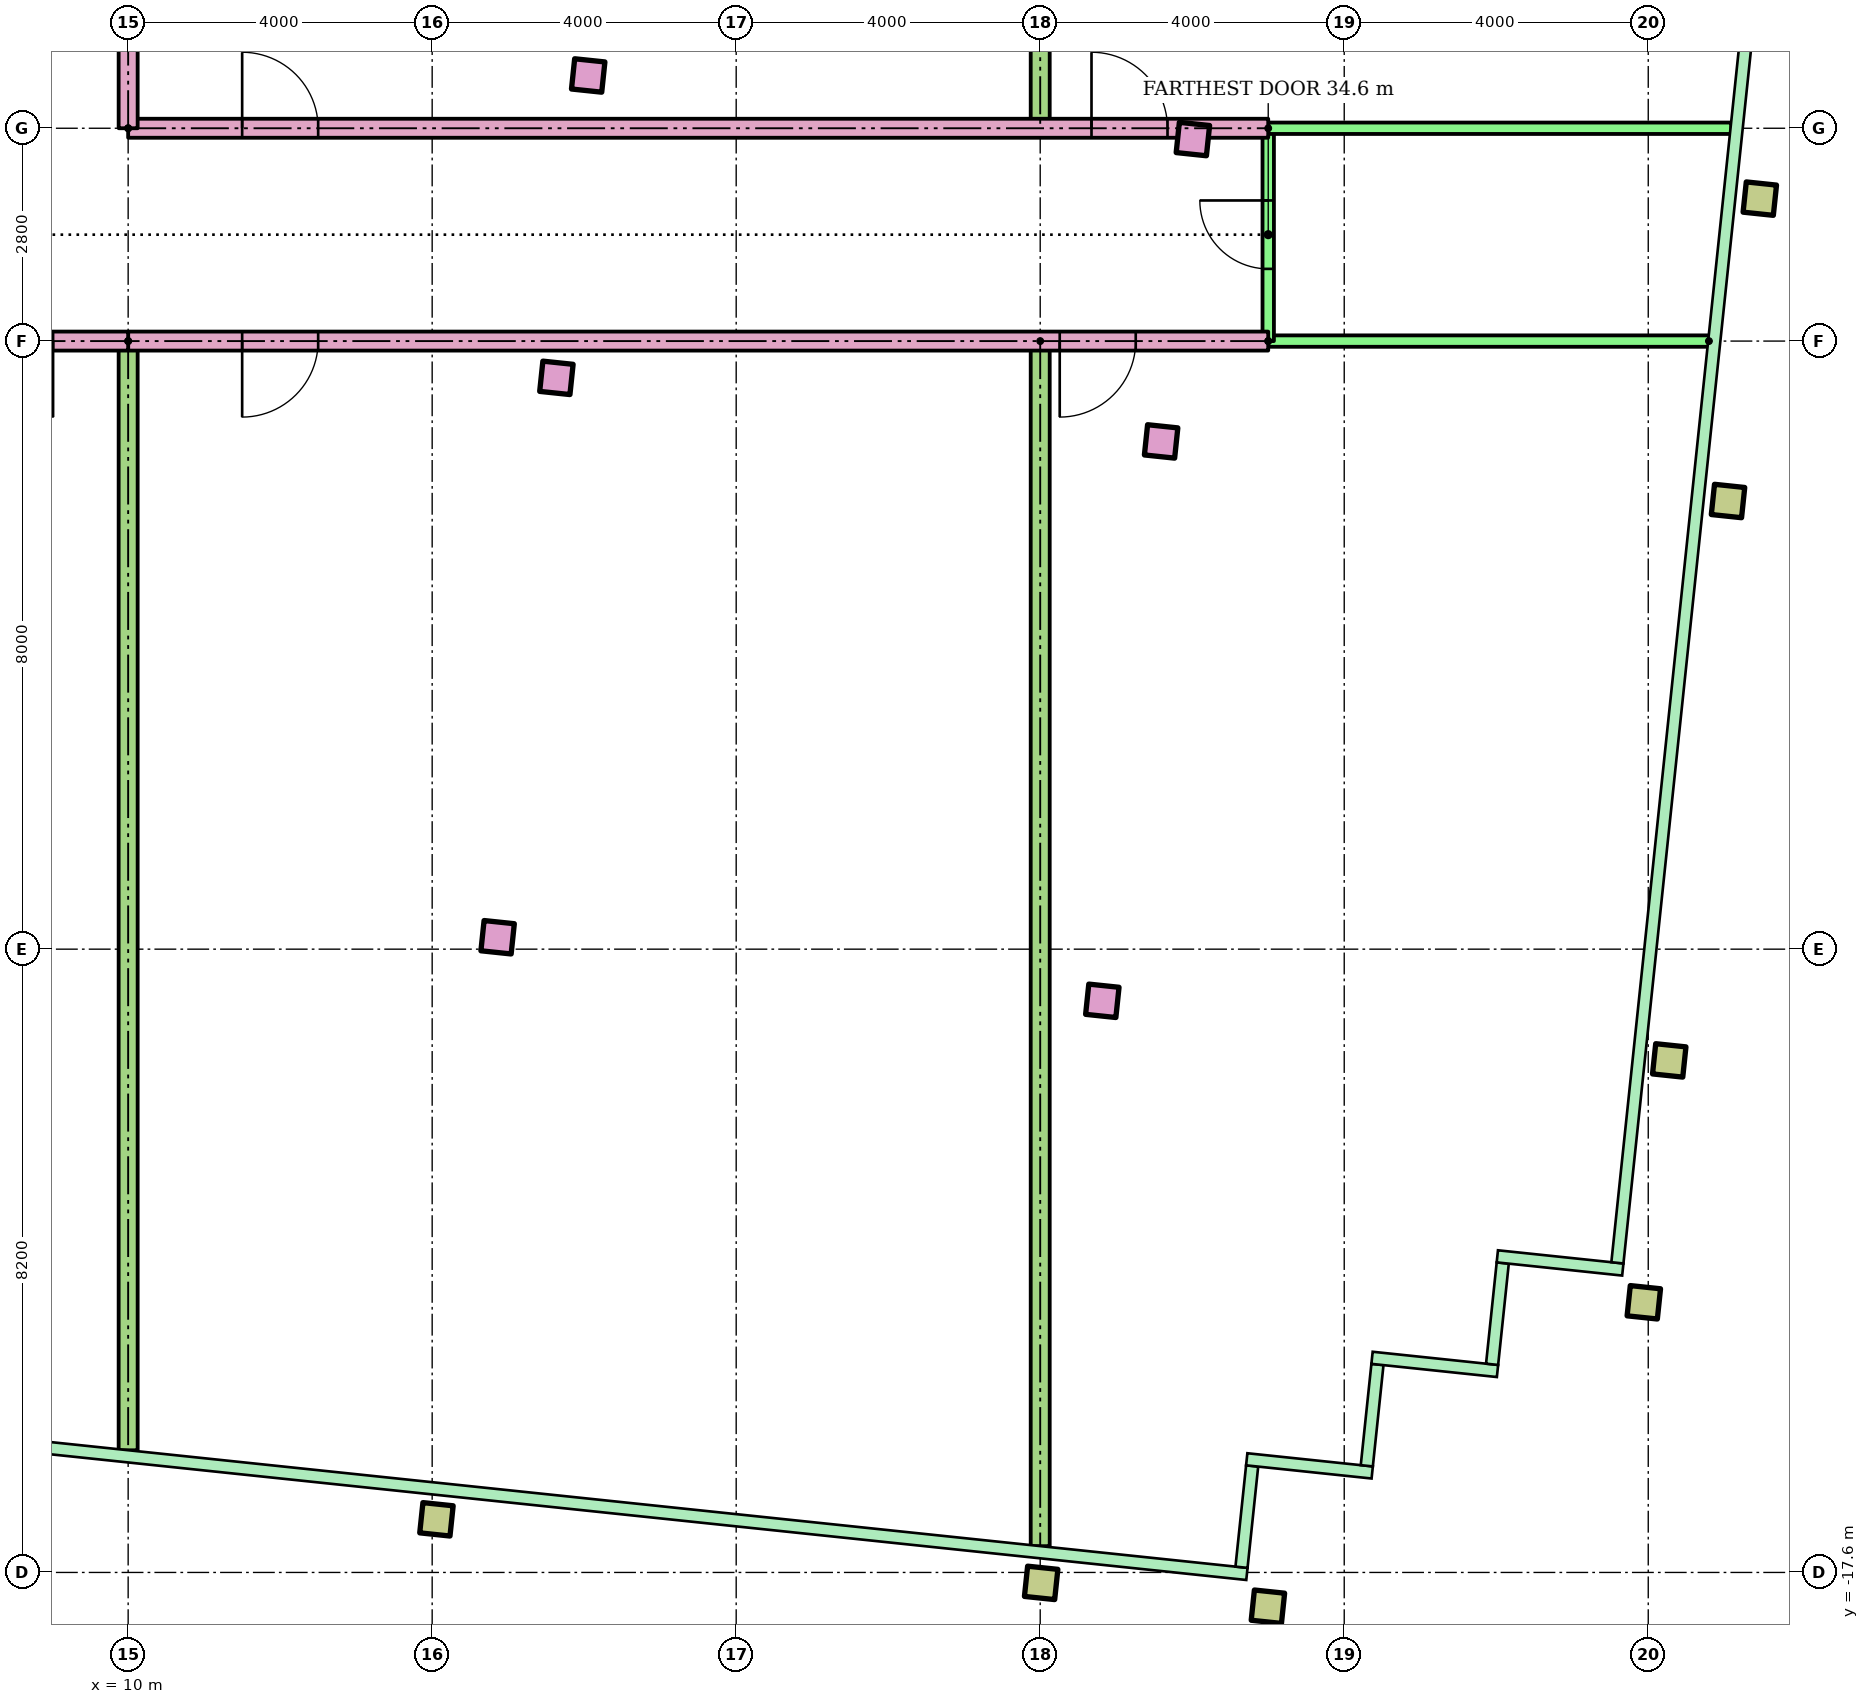
"""IFC4 building model, lengths in metres.
Left out: names, types, materials, properties, quantities, classifications, styles, units other than length and angle.
Written with IfcOpenShell. Run it as: python <this file> out.ifc"""

import sys

from ifc_helpers import new_model, si_unit, direction, frame, frame_2d, origin, origin_2d, place, context, subcontext, project, spatial, rectangle, hollow_rectangle, extrude, element, fill, save


model = new_model("IFC4")
c1 = context("Model", 3, precision=1e-05, world=origin(), true_north=direction((0.0, 1.0)))
c2 = subcontext(c1, "Body", "Model", "MODEL_VIEW")
j1 = project(units=[si_unit("LENGTHUNIT", "METRE"), si_unit("PLANEANGLEUNIT", "RADIAN")], contexts=[c1])
p1 = place(None, origin())
s1 = spatial("IfcSite", under=j1, at=p1, CompositionType="ELEMENT")
p2 = place(p1, origin())
s2 = spatial("IfcBuilding", under=s1, at=p2, CompositionType="ELEMENT")
p3 = place(p2, frame((0.0, 0.0, 298.3)))
s3 = spatial("IfcBuildingStorey", under=s2, at=p3, CompositionType="ELEMENT", Elevation=298.3)
for number, where, z_axis, x_axis in (
    (1, (14.056, -16.901, 0.0), (0.0, 0.0, 1.0), (0.995, -0.105, 0.0)),
    (2, (22.012, -17.737, 0.0), (0.0, 0.0, 1.0), (0.995, -0.105, 0.0)),
    (3, (24.996, -18.051, 0.0), (0.0, 0.0, 1.0), (0.995, -0.105, 0.0)),
    (4, (29.942, -14.046, 0.0), (0.0, 0.0, 1.0), (0.995, -0.105, 0.0)),
):
    element("IfcColumn", number, at=place(p3, frame(where, z_axis=z_axis, x_axis=x_axis)), inside=s3, PredefinedType="COLUMN", context=c2, shape_type="SweptSolid", body=[
        extrude(hollow_rectangle(XDim=0.4, YDim=0.4, WallThickness=0.02, at=origin_2d()), origin(), (0.0, 0.0, 1.0), 3.4),
    ])
for number, where, z_axis, x_axis in (
    (5, (14.861, -9.243, 0.0), (0.0, 0.0, 1.0), (0.995, -0.105, 0.0)),
    (6, (22.817, -10.08, 0.0), (0.0, 0.0, 1.0), (0.995, -0.105, 0.0)),
):
    element("IfcColumn", number, at=place(p3, frame(where, z_axis=z_axis, x_axis=x_axis)), inside=s3, PredefinedType="COLUMN", context=c2, shape_type="SweptSolid", body=[
        extrude(rectangle(XDim=0.4, YDim=0.4, at=origin_2d()), origin(), (0.0, 0.0, 1.0), 3.4),
    ])
p4 = place(p3, frame((30.276, -10.864, 0.0), z_axis=(0.0, 0.0, 1.0), x_axis=(0.994521895368, -0.104528463268, 0.0)))
e7 = element("IfcColumn", 7, at=p4, inside=s3, PredefinedType="COLUMN", context=c2, shape_type="SweptSolid", body=[
    extrude(hollow_rectangle(XDim=0.4, YDim=0.4, WallThickness=0.02, at=origin_2d()), origin(), (0.0, 0.0, 1.0), 3.4),
])
for number, where, z_axis, x_axis in (
    (8, (15.635, -1.884, 0.0), (0.0, 0.0, 1.0), (0.995, -0.105, 0.0)),
    (9, (23.591, -2.72, 0.0), (0.0, 0.0, 1.0), (0.995, -0.105, 0.0)),
):
    element("IfcColumn", number, at=place(p3, frame(where, z_axis=z_axis, x_axis=x_axis)), inside=s3, PredefinedType="COLUMN", context=c2, shape_type="SweptSolid", body=[
        extrude(rectangle(XDim=0.4, YDim=0.4, at=origin_2d()), origin(), (0.0, 0.0, 1.0), 3.4),
    ])
p5 = place(p3, frame((31.05, -3.504, 0.0), z_axis=(0.0, 0.0, 1.0), x_axis=(0.994521895368, -0.104528463268, 0.0)))
e10 = element("IfcColumn", 10, at=p5, inside=s3, PredefinedType="COLUMN", context=c2, shape_type="SweptSolid", body=[
    extrude(hollow_rectangle(XDim=0.4, YDim=0.4, WallThickness=0.02, at=origin_2d()), origin(), (0.0, 0.0, 1.0), 3.4),
])
for number, where, z_axis, x_axis in (
    (11, (16.053, 2.094, 0.0), (0.0, 0.0, 1.0), (0.995, -0.105, 0.0)),
    (12, (24.009, 1.258, 0.0), (0.0, 0.0, 1.0), (0.995, -0.105, 0.0)),
):
    element("IfcColumn", number, at=place(p3, frame(where, z_axis=z_axis, x_axis=x_axis)), inside=s3, PredefinedType="COLUMN", context=c2, shape_type="SweptSolid", body=[
        extrude(rectangle(XDim=0.4, YDim=0.4, at=origin_2d()), origin(), (0.0, 0.0, 1.0), 3.4),
    ])
p6 = place(p3, frame((31.468, 0.474, 0.0), z_axis=(0.0, 0.0, 1.0), x_axis=(0.994521895368, -0.104528463268, 0.0)))
e13 = element("IfcColumn", 13, at=p6, inside=s3, PredefinedType="COLUMN", context=c2, shape_type="SweptSolid", body=[
    extrude(hollow_rectangle(XDim=0.4, YDim=0.4, WallThickness=0.02, at=origin_2d()), origin(), (0.0, 0.0, 1.0), 3.4),
])
p7 = place(p3, frame((25.0, -1.4, 0.0), z_axis=(0.0, 0.0, 1.0), x_axis=(-1.0, 0.0, 0.0)))
e14 = element("IfcWall", 14, at=p7, inside=s3, PredefinedType="PARTITIONING", context=c2, shape_type="SweptSolid", body=[
    extrude(rectangle(XDim=15.0, YDim=0.25, at=frame_2d((7.5, 0.0))), origin(), (0.0, 0.0, 1.0), 2.6),
])
p8 = place(p7, frame((12.5, 0.0, 0.0)))
e15 = element("IfcOpeningElement", 15, at=p8, cuts=e14, PredefinedType="OPENING", context=c2, shape_type="SweptSolid", body=[
    extrude(rectangle(XDim=1.0, YDim=2.1, at=frame_2d((0.5, 1.05))), frame((0.0, 0.135, 0.0), z_axis=(0.0, -1.0, 0.0), x_axis=(1.0, 0.0, 0.0)), (0.0, 0.0, 1.0), 0.27),
])
p9 = place(p7, frame((1.743, 0.0, 0.0)))
e16 = element("IfcOpeningElement", 16, at=p9, cuts=e14, PredefinedType="OPENING", context=c2, shape_type="SweptSolid", body=[
    extrude(rectangle(XDim=1.0, YDim=2.1, at=frame_2d((0.5, 1.05))), frame((0.0, 0.135, 0.0), z_axis=(0.0, -1.0, 0.0), x_axis=(1.0, 0.0, 0.0)), (0.0, 0.0, 1.0), 0.27),
])
p10 = place(p3, frame((30.798, -1.4, 0.0), z_axis=(0.0, 0.0, 1.0), x_axis=(-1.0, 0.0, 0.0)))
e17 = element("IfcWall", 17, at=p10, inside=s3, PredefinedType="PARTITIONING", context=c2, shape_type="SweptSolid", body=[
    extrude(rectangle(XDim=5.798, YDim=0.15, at=frame_2d((2.899, 0.0))), origin(), (0.0, 0.0, 1.0), 2.6),
])
p11 = place(p3, frame((25.0, -1.4, 0.0), z_axis=(0.0, 0.0, 1.0), x_axis=(0.0, 1.0, 0.0)))
e18 = element("IfcWall", 18, at=p11, inside=s3, PredefinedType="PARTITIONING", context=c2, shape_type="SweptSolid", body=[
    extrude(rectangle(XDim=2.8, YDim=0.15, at=frame_2d((1.4, 0.0))), origin(), (0.0, 0.0, 1.0), 2.6),
])
p12 = place(p11, frame((0.95, 0.0, 0.0)))
e19 = element("IfcOpeningElement", 19, at=p12, cuts=e18, PredefinedType="OPENING", context=c2, shape_type="SweptSolid", body=[
    extrude(rectangle(XDim=0.9, YDim=2.1, at=frame_2d((0.45, 1.05))), frame((0.0, 0.085, 0.0), z_axis=(0.0, -1.0, 0.0), x_axis=(1.0, 0.0, 0.0)), (0.0, 0.0, 1.0), 0.17),
])
p13 = place(p3, frame((10.0, -1.4, 0.0), z_axis=(0.0, 0.0, 1.0), x_axis=(0.0, -1.0, 0.0)))
e20 = element("IfcWall", 20, at=p13, inside=s3, PredefinedType="PARTITIONING", context=c2, shape_type="SweptSolid", body=[
    extrude(rectangle(XDim=14.593, YDim=0.25, at=frame_2d((7.297, 0.0))), origin(), (0.0, 0.0, 1.0), 2.6),
])
p14 = place(p3, frame((22.0, -1.4, 0.0), z_axis=(0.0, 0.0, 1.0), x_axis=(0.0, -1.0, 0.0)))
e21 = element("IfcWall", 21, at=p14, inside=s3, PredefinedType="PARTITIONING", context=c2, shape_type="SweptSolid", body=[
    extrude(rectangle(XDim=15.854, YDim=0.25, at=frame_2d((7.927, 0.0))), origin(), (0.0, 0.0, 1.0), 2.6),
])
p15 = place(p3, frame((10.0, 1.4, 0.0)))
e22 = element("IfcWall", 22, at=p15, inside=s3, PredefinedType="PARTITIONING", context=c2, shape_type="SweptSolid", body=[
    extrude(rectangle(XDim=15.0, YDim=0.25, at=frame_2d((7.5, 0.0))), origin(), (0.0, 0.0, 1.0), 2.6),
])
p16 = place(p15, frame((1.5, 0.0, 0.0)))
e23 = element("IfcOpeningElement", 23, at=p16, cuts=e22, PredefinedType="OPENING", context=c2, shape_type="SweptSolid", body=[
    extrude(rectangle(XDim=1.0, YDim=2.1, at=frame_2d((0.5, 1.05))), frame((0.0, 0.135, 0.0), z_axis=(0.0, -1.0, 0.0), x_axis=(1.0, 0.0, 0.0)), (0.0, 0.0, 1.0), 0.27),
])
p17 = place(p15, frame((12.675, 0.0, 0.0)))
e24 = element("IfcOpeningElement", 24, at=p17, cuts=e22, PredefinedType="OPENING", context=c2, shape_type="SweptSolid", body=[
    extrude(rectangle(XDim=1.0, YDim=2.1, at=frame_2d((0.5, 1.05))), frame((0.0, 0.135, 0.0), z_axis=(0.0, -1.0, 0.0), x_axis=(1.0, 0.0, 0.0)), (0.0, 0.0, 1.0), 0.27),
])
p18 = place(p3, frame((25.0, 1.4, 0.0)))
e25 = element("IfcWall", 25, at=p18, inside=s3, PredefinedType="PARTITIONING", context=c2, shape_type="SweptSolid", body=[
    extrude(rectangle(XDim=6.093, YDim=0.15, at=frame_2d((3.046, 0.0))), origin(), (0.0, 0.0, 1.0), 2.6),
])
p19 = place(p3, frame((22.0, 18.584, 0.0), z_axis=(0.0, 0.0, 1.0), x_axis=(0.0, -1.0, 0.0)))
e26 = element("IfcWall", 26, at=p19, inside=s3, PredefinedType="PARTITIONING", context=c2, shape_type="SweptSolid", body=[
    extrude(rectangle(XDim=17.184, YDim=0.25, at=frame_2d((8.592, 0.0))), origin(), (0.0, 0.0, 1.0), 2.6),
])
p20 = place(p3, frame((10.0, -1.4, 0.0), z_axis=(0.0, 0.0, 1.0), x_axis=(-1.0, 0.0, 0.0)))
e27 = element("IfcWall", 27, at=p20, inside=s3, PredefinedType="PARTITIONING", context=c2, shape_type="SweptSolid", body=[
    extrude(rectangle(XDim=20.0, YDim=0.25, at=frame_2d((10.0, 0.0))), origin(), (0.0, 0.0, 1.0), 2.6),
])
p21 = place(p20, frame((13.5, 0.0, 0.0)))
e28 = element("IfcOpeningElement", 28, at=p21, cuts=e27, PredefinedType="OPENING", context=c2, shape_type="SweptSolid", body=[
    extrude(rectangle(XDim=1.0, YDim=2.1, at=frame_2d((0.5, 1.05))), frame((0.0, 0.135, 0.0), z_axis=(0.0, -1.0, 0.0), x_axis=(1.0, 0.0, 0.0)), (0.0, 0.0, 1.0), 0.27),
])
p22 = place(p20, frame((0.988, 0.0, 0.0)))
e29 = element("IfcOpeningElement", 29, at=p22, cuts=e27, PredefinedType="OPENING", context=c2, shape_type="SweptSolid", body=[
    extrude(rectangle(XDim=1.0, YDim=2.1, at=frame_2d((0.5, 1.05))), frame((0.0, 0.135, 0.0), z_axis=(0.0, -1.0, 0.0), x_axis=(1.0, 0.0, 0.0)), (0.0, 0.0, 1.0), 0.27),
])
p23 = place(p3, frame((10.0, 1.4, 0.0), z_axis=(0.0, 0.0, 1.0), x_axis=(0.0, 1.0, 0.0)))
e30 = element("IfcWall", 30, at=p23, inside=s3, PredefinedType="PARTITIONING", context=c2, shape_type="SweptSolid", body=[
    extrude(rectangle(XDim=1.6, YDim=0.25, at=frame_2d((0.8, 0.0))), origin(), (0.0, 0.0, 1.0), 2.6),
])
p24 = place(p8, origin())
e31 = element("IfcDoor", 31, at=p24, inside=s3, OperationType="SINGLE_SWING_RIGHT", PredefinedType="DOOR", context=c2, shape_type="SweptSolid", body=[
    extrude(rectangle(XDim=1.0, YDim=2.1, at=frame_2d((0.5, 1.05))), frame((0.0, 0.025, 0.0), z_axis=(0.0, -1.0, 0.0), x_axis=(1.0, 0.0, 0.0)), (0.0, 0.0, 1.0), 0.05),
])
fill(e15, e31)
p25 = place(p9, origin())
e32 = element("IfcDoor", 32, at=p25, inside=s3, OperationType="SINGLE_SWING_RIGHT", PredefinedType="DOOR", context=c2, shape_type="SweptSolid", body=[
    extrude(rectangle(XDim=1.0, YDim=2.1, at=frame_2d((0.5, 1.05))), frame((0.0, 0.025, 0.0), z_axis=(0.0, -1.0, 0.0), x_axis=(1.0, 0.0, 0.0)), (0.0, 0.0, 1.0), 0.05),
])
fill(e16, e32)
p26 = place(p12, origin())
e33 = element("IfcDoor", 33, at=p26, inside=s3, OperationType="SINGLE_SWING_RIGHT", PredefinedType="DOOR", context=c2, shape_type="SweptSolid", body=[
    extrude(rectangle(XDim=0.9, YDim=2.1, at=frame_2d((0.45, 1.05))), frame((0.0, 0.025, 0.0), z_axis=(0.0, -1.0, 0.0), x_axis=(1.0, 0.0, 0.0)), (0.0, 0.0, 1.0), 0.05),
])
fill(e19, e33)
p27 = place(p16, origin())
e34 = element("IfcDoor", 34, at=p27, inside=s3, OperationType="SINGLE_SWING_LEFT", PredefinedType="DOOR", context=c2, shape_type="SweptSolid", body=[
    extrude(rectangle(XDim=1.0, YDim=2.1, at=frame_2d((0.5, 1.05))), frame((0.0, 0.025, 0.0), z_axis=(0.0, -1.0, 0.0), x_axis=(1.0, 0.0, 0.0)), (0.0, 0.0, 1.0), 0.05),
])
fill(e23, e34)
p28 = place(p17, origin())
e35 = element("IfcDoor", 35, at=p28, inside=s3, OperationType="SINGLE_SWING_LEFT", PredefinedType="DOOR", context=c2, shape_type="SweptSolid", body=[
    extrude(rectangle(XDim=1.0, YDim=2.1, at=frame_2d((0.5, 1.05))), frame((0.0, 0.025, 0.0), z_axis=(0.0, -1.0, 0.0), x_axis=(1.0, 0.0, 0.0)), (0.0, 0.0, 1.0), 0.05),
])
fill(e24, e35)
p29 = place(p22, origin())
e36 = element("IfcDoor", 36, at=p29, inside=s3, OperationType="SINGLE_SWING_LEFT", PredefinedType="DOOR", context=c2, shape_type="SweptSolid", body=[
    extrude(rectangle(XDim=1.0, YDim=2.1, at=frame_2d((0.5, 1.05))), frame((0.0, 0.025, 0.0), z_axis=(0.0, -1.0, 0.0), x_axis=(1.0, 0.0, 0.0)), (0.0, 0.0, 1.0), 0.05),
])
fill(e29, e36)
save(model, sys.argv[1])
